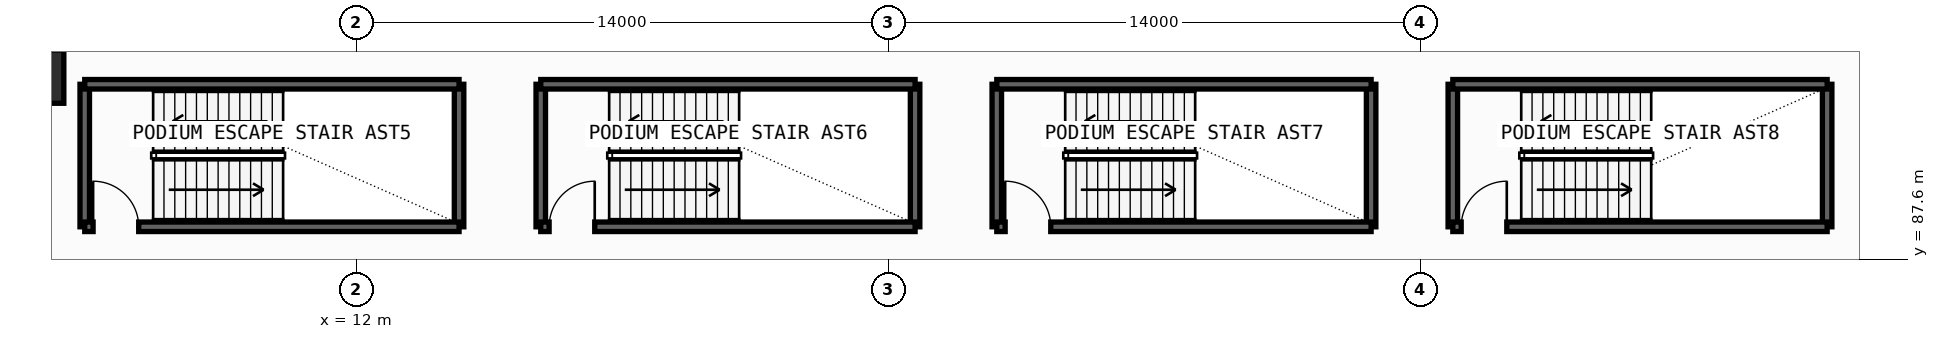
"""IFC4 building model, lengths in metres.
Left out: names, types, materials, properties, quantities, classifications, styles, units other than length and angle.
Written with IfcOpenShell. Run it as: python <this file> out.ifc"""

import sys

from ifc_helpers import new_model, si_unit, direction, frame, frame_2d, origin, origin_2d, place, context, subcontext, project, spatial, rectangle, extrude, element, fill, save


model = new_model("IFC4")
c1 = context("Model", 3, precision=1e-05, world=origin(), true_north=direction((0.0, 1.0)))
c2 = subcontext(c1, "Body", "Model", "MODEL_VIEW")
j1 = project(units=[si_unit("LENGTHUNIT", "METRE"), si_unit("PLANEANGLEUNIT", "RADIAN")], contexts=[c1])
p1 = place(None, origin())
s1 = spatial("IfcSite", under=j1, at=p1, CompositionType="ELEMENT")
p2 = place(p1, origin())
s2 = spatial("IfcBuilding", under=s1, at=p2, CompositionType="ELEMENT")
p3 = place(p2, frame((0.0, 0.0, 4.5)))
s3 = spatial("IfcBuildingStorey", under=s2, at=p3, CompositionType="ELEMENT", Elevation=4.5)
p4 = place(p3, frame((3.6, 92.4, 0.0), z_axis=(0.0, 0.0, 1.0), x_axis=(1.0, 0.0, 0.0)))
e1 = element("IfcColumn", 1, at=p4, inside=s3, PredefinedType="COLUMN", context=c2, shape_type="SweptSolid", body=[
    extrude(rectangle(XDim=1.4, YDim=1.4, at=origin_2d()), origin(), (0.0, 0.0, 1.0), 4.5),
])
for number, where, z_axis, x_axis in (
    (2, (4.85, 88.45, -0.32), (0.0, 0.0, 1.0), (0.0, 1.0, 0.0)),
    (3, (14.7, 88.45, -0.32), (0.0, 0.0, 1.0), (0.0, 1.0, 0.0)),
):
    element("IfcWall", number, at=place(p3, frame(where, z_axis=z_axis, x_axis=x_axis)), inside=s3, PredefinedType="SOLIDWALL", context=c2, shape_type="SweptSolid", body=[
        extrude(rectangle(XDim=3.75, YDim=0.25, at=frame_2d((1.875, 0.0))), origin(), (0.0, 0.0, 1.0), 4.5),
    ])
p5 = place(p3, frame((4.85, 92.2, -0.32), z_axis=(0.0, 0.0, 1.0), x_axis=(1.0, 0.0, 0.0)))
e4 = element("IfcWall", 4, at=p5, inside=s3, PredefinedType="SOLIDWALL", context=c2, shape_type="SweptSolid", body=[
    extrude(rectangle(XDim=9.85, YDim=0.25, at=frame_2d((4.925, 0.0))), origin(), (0.0, 0.0, 1.0), 4.5),
])
p6 = place(p3, frame((4.85, 88.45, -0.32), z_axis=(0.0, 0.0, 1.0), x_axis=(1.0, 0.0, 0.0)))
e5 = element("IfcWall", 5, at=p6, inside=s3, PredefinedType="SOLIDWALL", context=c2, shape_type="SweptSolid", body=[
    extrude(rectangle(XDim=9.85, YDim=0.25, at=frame_2d((4.925, 0.0))), origin(), (0.0, 0.0, 1.0), 4.5),
])
p7 = place(p6, frame((0.22, 0.0, 0.32)))
e6 = element("IfcOpeningElement", 6, at=p7, cuts=e5, PredefinedType="OPENING", context=c2, shape_type="SweptSolid", body=[
    extrude(rectangle(XDim=1.2, YDim=2.2, at=frame_2d((0.6, 1.1))), frame((0.0, 0.135, 0.0), z_axis=(0.0, -1.0, 0.0), x_axis=(1.0, 0.0, 0.0)), (0.0, 0.0, 1.0), 0.27),
])
for number, where, z_axis, x_axis in (
    (7, (16.85, 88.45, -0.32), (0.0, 0.0, 1.0), (0.0, 1.0, 0.0)),
    (8, (26.7, 88.45, -0.32), (0.0, 0.0, 1.0), (0.0, 1.0, 0.0)),
):
    element("IfcWall", number, at=place(p3, frame(where, z_axis=z_axis, x_axis=x_axis)), inside=s3, PredefinedType="SOLIDWALL", context=c2, shape_type="SweptSolid", body=[
        extrude(rectangle(XDim=3.75, YDim=0.25, at=frame_2d((1.875, 0.0))), origin(), (0.0, 0.0, 1.0), 4.5),
    ])
p8 = place(p3, frame((16.85, 92.2, -0.32), z_axis=(0.0, 0.0, 1.0), x_axis=(1.0, 0.0, 0.0)))
e9 = element("IfcWall", 9, at=p8, inside=s3, PredefinedType="SOLIDWALL", context=c2, shape_type="SweptSolid", body=[
    extrude(rectangle(XDim=9.85, YDim=0.25, at=frame_2d((4.925, 0.0))), origin(), (0.0, 0.0, 1.0), 4.5),
])
p9 = place(p3, frame((16.85, 88.45, -0.32), z_axis=(0.0, 0.0, 1.0), x_axis=(1.0, 0.0, 0.0)))
e10 = element("IfcWall", 10, at=p9, inside=s3, PredefinedType="SOLIDWALL", context=c2, shape_type="SweptSolid", body=[
    extrude(rectangle(XDim=9.85, YDim=0.25, at=frame_2d((4.925, 0.0))), origin(), (0.0, 0.0, 1.0), 4.5),
])
p10 = place(p9, frame((0.22, 0.0, 0.32)))
e11 = element("IfcOpeningElement", 11, at=p10, cuts=e10, PredefinedType="OPENING", context=c2, shape_type="SweptSolid", body=[
    extrude(rectangle(XDim=1.2, YDim=2.2, at=frame_2d((0.6, 1.1))), frame((0.0, 0.135, 0.0), z_axis=(0.0, -1.0, 0.0), x_axis=(1.0, 0.0, 0.0)), (0.0, 0.0, 1.0), 0.27),
])
for number, where, z_axis, x_axis in (
    (12, (28.85, 88.45, -0.32), (0.0, 0.0, 1.0), (0.0, 1.0, 0.0)),
    (13, (38.7, 88.45, -0.32), (0.0, 0.0, 1.0), (0.0, 1.0, 0.0)),
):
    element("IfcWall", number, at=place(p3, frame(where, z_axis=z_axis, x_axis=x_axis)), inside=s3, PredefinedType="SOLIDWALL", context=c2, shape_type="SweptSolid", body=[
        extrude(rectangle(XDim=3.75, YDim=0.25, at=frame_2d((1.875, 0.0))), origin(), (0.0, 0.0, 1.0), 4.5),
    ])
p11 = place(p3, frame((28.85, 92.2, -0.32), z_axis=(0.0, 0.0, 1.0), x_axis=(1.0, 0.0, 0.0)))
e14 = element("IfcWall", 14, at=p11, inside=s3, PredefinedType="SOLIDWALL", context=c2, shape_type="SweptSolid", body=[
    extrude(rectangle(XDim=9.85, YDim=0.25, at=frame_2d((4.925, 0.0))), origin(), (0.0, 0.0, 1.0), 4.5),
])
p12 = place(p3, frame((28.85, 88.45, -0.32), z_axis=(0.0, 0.0, 1.0), x_axis=(1.0, 0.0, 0.0)))
e15 = element("IfcWall", 15, at=p12, inside=s3, PredefinedType="SOLIDWALL", context=c2, shape_type="SweptSolid", body=[
    extrude(rectangle(XDim=9.85, YDim=0.25, at=frame_2d((4.925, 0.0))), origin(), (0.0, 0.0, 1.0), 4.5),
])
p13 = place(p12, frame((0.22, 0.0, 0.32)))
e16 = element("IfcOpeningElement", 16, at=p13, cuts=e15, PredefinedType="OPENING", context=c2, shape_type="SweptSolid", body=[
    extrude(rectangle(XDim=1.2, YDim=2.2, at=frame_2d((0.6, 1.1))), frame((0.0, 0.135, 0.0), z_axis=(0.0, -1.0, 0.0), x_axis=(1.0, 0.0, 0.0)), (0.0, 0.0, 1.0), 0.27),
])
for number, where, z_axis, x_axis in (
    (17, (40.85, 88.45, -0.32), (0.0, 0.0, 1.0), (0.0, 1.0, 0.0)),
    (18, (50.7, 88.45, -0.32), (0.0, 0.0, 1.0), (0.0, 1.0, 0.0)),
):
    element("IfcWall", number, at=place(p3, frame(where, z_axis=z_axis, x_axis=x_axis)), inside=s3, PredefinedType="SOLIDWALL", context=c2, shape_type="SweptSolid", body=[
        extrude(rectangle(XDim=3.75, YDim=0.25, at=frame_2d((1.875, 0.0))), origin(), (0.0, 0.0, 1.0), 4.5),
    ])
p14 = place(p3, frame((40.85, 92.2, -0.32), z_axis=(0.0, 0.0, 1.0), x_axis=(1.0, 0.0, 0.0)))
e19 = element("IfcWall", 19, at=p14, inside=s3, PredefinedType="SOLIDWALL", context=c2, shape_type="SweptSolid", body=[
    extrude(rectangle(XDim=9.85, YDim=0.25, at=frame_2d((4.925, 0.0))), origin(), (0.0, 0.0, 1.0), 4.5),
])
p15 = place(p3, frame((40.85, 88.45, -0.32), z_axis=(0.0, 0.0, 1.0), x_axis=(1.0, 0.0, 0.0)))
e20 = element("IfcWall", 20, at=p15, inside=s3, PredefinedType="SOLIDWALL", context=c2, shape_type="SweptSolid", body=[
    extrude(rectangle(XDim=9.85, YDim=0.25, at=frame_2d((4.925, 0.0))), origin(), (0.0, 0.0, 1.0), 4.5),
])
p16 = place(p15, frame((0.22, 0.0, 0.32)))
e21 = element("IfcOpeningElement", 21, at=p16, cuts=e20, PredefinedType="OPENING", context=c2, shape_type="SweptSolid", body=[
    extrude(rectangle(XDim=1.2, YDim=2.2, at=frame_2d((0.6, 1.1))), frame((0.0, 0.135, 0.0), z_axis=(0.0, -1.0, 0.0), x_axis=(1.0, 0.0, 0.0)), (0.0, 0.0, 1.0), 0.27),
])
p17 = place(p7, origin())
e22 = element("IfcDoor", 22, at=p17, inside=s3, OperationType="SINGLE_SWING_LEFT", PredefinedType="USERDEFINED", context=c2, shape_type="SweptSolid", body=[
    extrude(rectangle(XDim=1.2, YDim=2.2, at=frame_2d((0.6, 1.1))), frame((0.0, 0.025, 0.0), z_axis=(0.0, -1.0, 0.0), x_axis=(1.0, 0.0, 0.0)), (0.0, 0.0, 1.0), 0.05),
])
fill(e6, e22)
p18 = place(p10, origin())
e23 = element("IfcDoor", 23, at=p18, inside=s3, OperationType="SINGLE_SWING_RIGHT", PredefinedType="USERDEFINED", context=c2, shape_type="SweptSolid", body=[
    extrude(rectangle(XDim=1.2, YDim=2.2, at=frame_2d((0.6, 1.1))), frame((0.0, 0.025, 0.0), z_axis=(0.0, -1.0, 0.0), x_axis=(1.0, 0.0, 0.0)), (0.0, 0.0, 1.0), 0.05),
])
fill(e11, e23)
p19 = place(p13, origin())
e24 = element("IfcDoor", 24, at=p19, inside=s3, OperationType="SINGLE_SWING_LEFT", PredefinedType="USERDEFINED", context=c2, shape_type="SweptSolid", body=[
    extrude(rectangle(XDim=1.2, YDim=2.2, at=frame_2d((0.6, 1.1))), frame((0.0, 0.025, 0.0), z_axis=(0.0, -1.0, 0.0), x_axis=(1.0, 0.0, 0.0)), (0.0, 0.0, 1.0), 0.05),
])
fill(e16, e24)
p20 = place(p16, origin())
e25 = element("IfcDoor", 25, at=p20, inside=s3, OperationType="SINGLE_SWING_RIGHT", PredefinedType="USERDEFINED", context=c2, shape_type="SweptSolid", body=[
    extrude(rectangle(XDim=1.2, YDim=2.2, at=frame_2d((0.6, 1.1))), frame((0.0, 0.025, 0.0), z_axis=(0.0, -1.0, 0.0), x_axis=(1.0, 0.0, 0.0)), (0.0, 0.0, 1.0), 0.05),
])
fill(e21, e25)
save(model, sys.argv[1])
